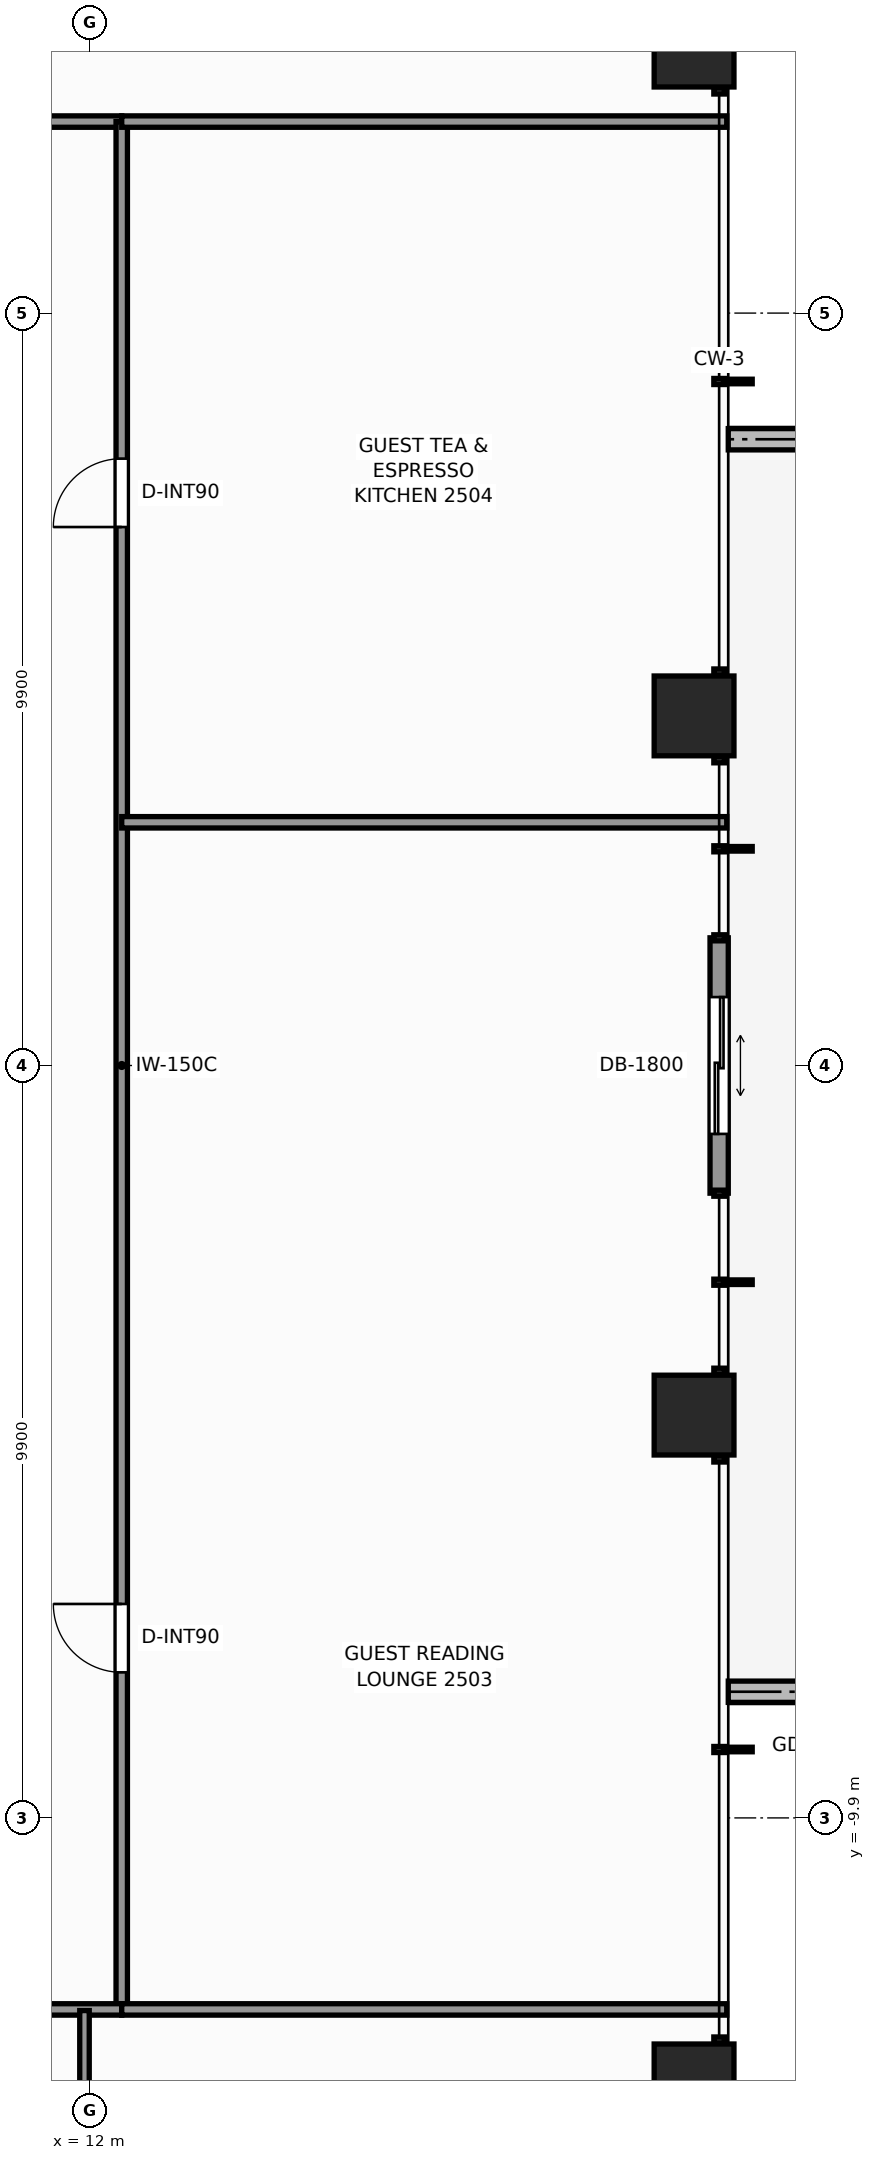
"""IFC4 building model, lengths in metres.
Left out: names, types, materials, properties, quantities, classifications, styles, units other than length and angle.
Written with IfcOpenShell. Run it as: python <this file> out.ifc"""

import sys

from ifc_helpers import new_model, si_unit, direction, frame, frame_2d, origin, origin_2d, place, context, subcontext, project, spatial, rectangle, extrude, element, fill, save


model = new_model("IFC4")
c1 = context("Model", 3, precision=1e-05, world=origin(), true_north=direction((0.0, 1.0)))
c2 = subcontext(c1, "Body", "Model", "MODEL_VIEW")
j1 = project(units=[si_unit("LENGTHUNIT", "METRE"), si_unit("PLANEANGLEUNIT", "RADIAN")], contexts=[c1])
p1 = place(None, origin())
s1 = spatial("IfcSite", under=j1, at=p1, CompositionType="ELEMENT")
p2 = place(p1, origin())
s2 = spatial("IfcBuilding", under=s1, at=p2, CompositionType="ELEMENT")
p3 = place(p2, frame((0.0, 0.0, 88.7)))
s3 = spatial("IfcBuildingStorey", under=s2, at=p3, CompositionType="ELEMENT", Elevation=88.7)
for number, where, z_axis, x_axis in (
    (1, (19.95, -13.4, 0.0), (0.0, 0.0, 1.0), (1.0, 0.0, 0.0)),
    (2, (19.95, -4.6, 0.0), (0.0, 0.0, 1.0), (1.0, 0.0, 0.0)),
    (3, (19.95, 4.6, 0.0), (0.0, 0.0, 1.0), (1.0, 0.0, 0.0)),
    (4, (19.95, 13.4, 0.0), (0.0, 0.0, 1.0), (1.0, 0.0, 0.0)),
):
    element("IfcColumn", number, at=place(p3, frame(where, z_axis=z_axis, x_axis=x_axis)), inside=s3, PredefinedType="COLUMN", context=c2, shape_type="SweptSolid", body=[
        extrude(rectangle(XDim=1.05, YDim=1.05, at=origin_2d()), origin(), (0.0, 0.0, 1.0), 3.3),
    ])
p4 = place(p3, frame((23.767, 8.24, -0.04), z_axis=(0.0, 0.0, 1.0), x_axis=(-1.0, 0.0, 0.0)))
e5 = element("IfcWall", 5, at=p4, inside=s3, PredefinedType="PARAPET", context=c2, shape_type="SweptSolid", body=[
    extrude(rectangle(XDim=3.367, YDim=0.28, at=frame_2d((1.684, 0.0))), origin(), (0.0, 0.0, 1.0), 0.42),
])
p5 = place(p3, frame((20.4, -8.24, -0.04), z_axis=(0.0, 0.0, 1.0), x_axis=(1.0, 0.0, 0.0)))
e6 = element("IfcWall", 6, at=p5, inside=s3, PredefinedType="PARAPET", context=c2, shape_type="SweptSolid", body=[
    extrude(rectangle(XDim=2.34, YDim=0.28, at=frame_2d((1.17, 0.0))), origin(), (0.0, 0.0, 1.0), 0.42),
])
p6 = place(p3, frame((20.28, 1.68, 0.0), z_axis=(0.0, 0.0, 1.0), x_axis=(0.0, -1.0, 0.0)))
e7 = element("IfcWall", 7, at=p6, inside=s3, PredefinedType="STANDARD", context=c2, shape_type="SweptSolid", body=[
    extrude(rectangle(XDim=3.36, YDim=0.24, at=frame_2d((1.68, 0.0))), origin(), (0.0, 0.0, 1.0), 3.08),
])
p7 = place(p6, frame((0.78, 0.0, 0.0)))
e8 = element("IfcOpeningElement", 8, at=p7, cuts=e7, PredefinedType="OPENING", context=c2, shape_type="SweptSolid", body=[
    extrude(rectangle(XDim=1.8, YDim=2.2, at=frame_2d((0.9, 1.1))), frame((0.0, 0.13, 0.0), z_axis=(0.0, -1.0, 0.0), x_axis=(1.0, 0.0, 0.0)), (0.0, 0.0, 1.0), 0.26),
])
p8 = place(p3, frame((-12.26, 12.42, 0.0), z_axis=(0.0, 0.0, 1.0), x_axis=(1.0, 0.0, 0.0)))
e9 = element("IfcWall", 9, at=p8, inside=s3, PredefinedType="PARTITIONING", context=c2, shape_type="SweptSolid", body=[
    extrude(rectangle(XDim=24.68, YDim=0.15, at=frame_2d((12.34, 0.0))), origin(), (0.0, 0.0, 1.0), 2.292),
])
p9 = place(p8, frame((4.275, 0.0, 0.0)))
e10 = element("IfcOpeningElement", 10, at=p9, cuts=e9, PredefinedType="OPENING", context=c2, shape_type="SweptSolid", body=[
    extrude(rectangle(XDim=0.9, YDim=2.06, at=frame_2d((0.45, 1.03))), frame((0.0, 0.085, 0.0), z_axis=(0.0, -1.0, 0.0), x_axis=(1.0, 0.0, 0.0)), (0.0, 0.0, 1.0), 0.17),
])
p10 = place(p8, frame((19.345, 0.0, 0.0)))
e11 = element("IfcOpeningElement", 11, at=p10, cuts=e9, PredefinedType="OPENING", context=c2, shape_type="SweptSolid", body=[
    extrude(rectangle(XDim=0.9, YDim=2.06, at=frame_2d((0.45, 1.03))), frame((0.0, 0.085, 0.0), z_axis=(0.0, -1.0, 0.0), x_axis=(1.0, 0.0, 0.0)), (0.0, 0.0, 1.0), 0.17),
])
p11 = place(p3, frame((12.42, -12.42, 0.0), z_axis=(0.0, 0.0, 1.0), x_axis=(0.0, 1.0, 0.0)))
e12 = element("IfcWall", 12, at=p11, inside=s3, PredefinedType="PARTITIONING", context=c2, shape_type="SweptSolid", body=[
    extrude(rectangle(XDim=24.84, YDim=0.15, at=frame_2d((12.42, 0.0))), origin(), (0.0, 0.0, 1.0), 2.292),
])
p12 = place(p11, frame((4.435, 0.0, 0.0)))
e13 = element("IfcOpeningElement", 13, at=p12, cuts=e12, PredefinedType="OPENING", context=c2, shape_type="SweptSolid", body=[
    extrude(rectangle(XDim=0.9, YDim=2.06, at=frame_2d((0.45, 1.03))), frame((0.0, 0.085, 0.0), z_axis=(0.0, -1.0, 0.0), x_axis=(1.0, 0.0, 0.0)), (0.0, 0.0, 1.0), 0.17),
])
p13 = place(p11, frame((19.505, 0.0, 0.0)))
e14 = element("IfcOpeningElement", 14, at=p13, cuts=e12, PredefinedType="OPENING", context=c2, shape_type="SweptSolid", body=[
    extrude(rectangle(XDim=0.9, YDim=2.06, at=frame_2d((0.45, 1.03))), frame((0.0, 0.085, 0.0), z_axis=(0.0, -1.0, 0.0), x_axis=(1.0, 0.0, 0.0)), (0.0, 0.0, 1.0), 0.17),
])
p14 = place(p3, frame((-3.65, -12.42, 0.0), z_axis=(0.0, 0.0, 1.0), x_axis=(1.0, 0.0, 0.0)))
e15 = element("IfcWall", 15, at=p14, inside=s3, PredefinedType="PARTITIONING", context=c2, shape_type="SweptSolid", body=[
    extrude(rectangle(XDim=16.07, YDim=0.15, at=frame_2d((8.035, 0.0))), origin(), (0.0, 0.0, 1.0), 2.292),
])
p15 = place(p14, frame((0.889, 0.0, 0.0)))
e16 = element("IfcOpeningElement", 16, at=p15, cuts=e15, PredefinedType="OPENING", context=c2, shape_type="SweptSolid", body=[
    extrude(rectangle(XDim=0.9, YDim=2.06, at=frame_2d((0.45, 1.03))), frame((0.0, 0.085, 0.0), z_axis=(0.0, -1.0, 0.0), x_axis=(1.0, 0.0, 0.0)), (0.0, 0.0, 1.0), 0.17),
])
p16 = place(p14, frame((4.722, 0.0, 0.0)))
e17 = element("IfcOpeningElement", 17, at=p16, cuts=e15, PredefinedType="OPENING", context=c2, shape_type="SweptSolid", body=[
    extrude(rectangle(XDim=0.95, YDim=2.06, at=frame_2d((0.475, 1.03))), frame((0.0, 0.085, 0.0), z_axis=(0.0, -1.0, 0.0), x_axis=(1.0, 0.0, 0.0)), (0.0, 0.0, 1.0), 0.17),
])
p17 = place(p14, frame((9.415, 0.0, 0.0)))
e18 = element("IfcOpeningElement", 18, at=p17, cuts=e15, PredefinedType="OPENING", context=c2, shape_type="SweptSolid", body=[
    extrude(rectangle(XDim=0.9, YDim=2.06, at=frame_2d((0.45, 1.03))), frame((0.0, 0.085, 0.0), z_axis=(0.0, -1.0, 0.0), x_axis=(1.0, 0.0, 0.0)), (0.0, 0.0, 1.0), 0.17),
])
p18 = place(p14, frame((11.313, 0.0, 0.0)))
e19 = element("IfcOpeningElement", 19, at=p18, cuts=e15, PredefinedType="OPENING", context=c2, shape_type="SweptSolid", body=[
    extrude(rectangle(XDim=0.95, YDim=2.06, at=frame_2d((0.475, 1.03))), frame((0.0, 0.085, 0.0), z_axis=(0.0, -1.0, 0.0), x_axis=(1.0, 0.0, 0.0)), (0.0, 0.0, 1.0), 0.17),
])
for number, where, z_axis, x_axis in (
    (20, (12.42, -12.42, 0.0), (0.0, 0.0, 1.0), (1.0, 0.0, 0.0)),
    (21, (12.42, 12.42, 0.0), (0.0, 0.0, 1.0), (1.0, 0.0, 0.0)),
):
    element("IfcWall", number, at=place(p3, frame(where, z_axis=z_axis, x_axis=x_axis)), inside=s3, PredefinedType="PARTITIONING", context=c2, shape_type="SweptSolid", body=[
        extrude(rectangle(XDim=7.96, YDim=0.15, at=frame_2d((3.98, 0.0))), origin(), (0.0, 0.0, 1.0), 2.292),
    ])
p19 = place(p3, frame((12.42, 3.2, 0.0), z_axis=(0.0, 0.0, 1.0), x_axis=(1.0, 0.0, 0.0)))
e22 = element("IfcWall", 22, at=p19, inside=s3, PredefinedType="PARTITIONING", context=c2, shape_type="SweptSolid", body=[
    extrude(rectangle(XDim=7.96, YDim=0.15, at=frame_2d((3.98, 0.0))), origin(), (0.0, 0.0, 1.0), 2.369),
])
p20 = place(p3, frame((11.93, -15.075, 0.0), z_axis=(0.0, 0.0, 1.0), x_axis=(0.0, 1.0, 0.0)))
e23 = element("IfcWall", 23, at=p20, inside=s3, PredefinedType="PARTITIONING", context=c2, shape_type="SweptSolid", body=[
    extrude(rectangle(XDim=2.64, YDim=0.125, at=frame_2d((1.32, 0.0))), origin(), (0.0, 0.0, 1.0), 2.292),
])
p21 = place(p7, origin())
e24 = element("IfcDoor", 24, at=p21, inside=s3, OperationType="DOUBLE_DOOR_SLIDING", PredefinedType="DOOR", context=c2, shape_type="SweptSolid", body=[
    extrude(rectangle(XDim=1.8, YDim=2.2, at=frame_2d((0.9, 1.1))), frame((0.0, 0.025, 0.0), z_axis=(0.0, -1.0, 0.0), x_axis=(1.0, 0.0, 0.0)), (0.0, 0.0, 1.0), 0.05),
])
fill(e8, e24)
p22 = place(p12, origin())
e25 = element("IfcDoor", 25, at=p22, inside=s3, OperationType="SINGLE_SWING_RIGHT", PredefinedType="DOOR", context=c2, shape_type="SweptSolid", body=[
    extrude(rectangle(XDim=0.9, YDim=2.06, at=frame_2d((0.45, 1.03))), frame((0.0, 0.025, 0.0), z_axis=(0.0, -1.0, 0.0), x_axis=(1.0, 0.0, 0.0)), (0.0, 0.0, 1.0), 0.05),
])
fill(e13, e25)
p23 = place(p13, origin())
e26 = element("IfcDoor", 26, at=p23, inside=s3, OperationType="SINGLE_SWING_LEFT", PredefinedType="DOOR", context=c2, shape_type="SweptSolid", body=[
    extrude(rectangle(XDim=0.9, YDim=2.06, at=frame_2d((0.45, 1.03))), frame((0.0, 0.025, 0.0), z_axis=(0.0, -1.0, 0.0), x_axis=(1.0, 0.0, 0.0)), (0.0, 0.0, 1.0), 0.05),
])
fill(e14, e26)
save(model, sys.argv[1])
